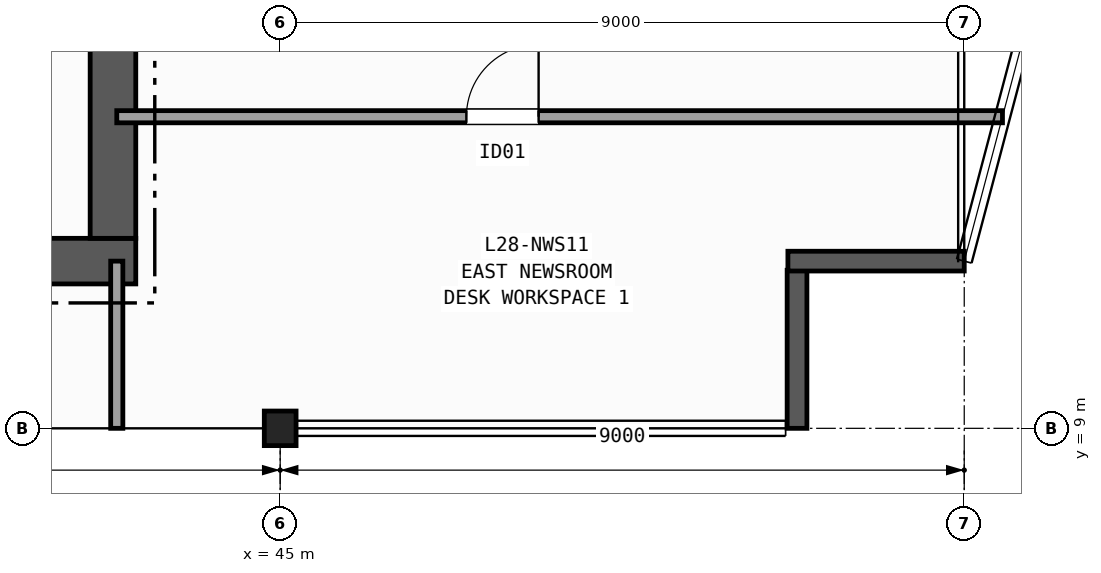
"""IFC4 building model, lengths in metres.
Left out: names, types, materials, properties, quantities, classifications, styles, units other than length and angle.
Written with IfcOpenShell. Run it as: python <this file> out.ifc"""

import sys

from ifc_helpers import new_model, si_unit, direction, frame, frame_2d, origin, origin_2d, place, context, subcontext, project, spatial, rectangle, i_section, extrude, element, fill, save


model = new_model("IFC4")
c1 = context("Model", 3, precision=1e-05, world=origin(), true_north=direction((0.0, 1.0)))
c2 = subcontext(c1, "Body", "Model", "MODEL_VIEW")
j1 = project(units=[si_unit("LENGTHUNIT", "METRE"), si_unit("PLANEANGLEUNIT", "RADIAN")], contexts=[c1])
p1 = place(None, origin())
s1 = spatial("IfcSite", under=j1, at=p1, CompositionType="ELEMENT")
p2 = place(p1, origin())
s2 = spatial("IfcBuilding", under=s1, at=p2, CompositionType="ELEMENT")
p3 = place(p2, frame((0.0, 0.0, 117.4)))
s3 = spatial("IfcBuildingStorey", under=s2, at=p3, CompositionType="ELEMENT", Elevation=117.4)
p4 = place(p3, frame((45.0, 9.0, 0.0), z_axis=(0.0, 0.0, 1.0), x_axis=(1.0, 0.0, 0.0)))
e1 = element("IfcColumn", 1, at=p4, inside=s3, PredefinedType="COLUMN", context=c2, shape_type="SweptSolid", body=[
    extrude(i_section(OverallWidth=0.418, OverallDepth=0.455, WebThickness=0.042, FlangeThickness=0.068, FilletRadius=0.015, at=origin_2d()), origin(), (0.0, 0.0, 1.0), 3.7),
])
p5 = place(p3, frame((51.8, 9.0, 0.0), z_axis=(0.0, 0.0, 1.0), x_axis=(0.0, 1.0, 0.0)))
e2 = element("IfcWall", 2, at=p5, inside=s3, PredefinedType="SOLIDWALL", context=c2, shape_type="SweptSolid", body=[
    extrude(rectangle(XDim=2.08, YDim=0.26, at=frame_2d((1.04, 0.0))), origin(), (0.0, 0.0, 1.0), 3.42),
])
p6 = place(p3, frame((51.68, 11.2, 0.0), z_axis=(0.0, 0.0, 1.0), x_axis=(1.0, 0.0, 0.0)))
e3 = element("IfcWall", 3, at=p6, inside=s3, PredefinedType="SOLIDWALL", context=c2, shape_type="SweptSolid", body=[
    extrude(rectangle(XDim=2.32, YDim=0.26, at=frame_2d((1.16, 0.0))), origin(), (0.0, 0.0, 1.0), 3.42),
])
p7 = place(p3, frame((29.1, 11.2, 0.0), z_axis=(0.0, 0.0, 1.0), x_axis=(1.0, 0.0, 0.0)))
e4 = element("IfcWall", 4, at=p7, inside=s3, PredefinedType="SHEAR", context=c2, shape_type="SweptSolid", body=[
    extrude(rectangle(XDim=14.0, YDim=0.6, at=frame_2d((7.0, 0.0))), origin(), (0.0, 0.0, 1.0), 3.42),
])
p8 = place(p3, frame((42.8, 11.5, 0.0), z_axis=(0.0, 0.0, 1.0), x_axis=(0.0, 1.0, 0.0)))
e5 = element("IfcWall", 5, at=p8, inside=s3, PredefinedType="SHEAR", context=c2, shape_type="SweptSolid", body=[
    extrude(rectangle(XDim=12.8, YDim=0.6, at=frame_2d((6.4, 0.0))), origin(), (0.0, 0.0, 1.0), 3.42),
])
p9 = place(p3, frame((42.85, 9.0, 0.0), z_axis=(0.0, 0.0, 1.0), x_axis=(0.0, 1.0, 0.0)))
e6 = element("IfcWall", 6, at=p9, inside=s3, PredefinedType="PARTITIONING", context=c2, shape_type="SweptSolid", body=[
    extrude(rectangle(XDim=2.2, YDim=0.16, at=frame_2d((1.1, 0.0))), origin(), (0.0, 0.0, 1.0), 2.634),
])
p10 = place(p3, frame((42.85, 13.1, 0.0), z_axis=(0.0, 0.0, 1.0), x_axis=(1.0, 0.0, 0.0)))
e7 = element("IfcWall", 7, at=p10, inside=s3, PredefinedType="PARTITIONING", context=c2, shape_type="SweptSolid", body=[
    extrude(rectangle(XDim=11.653, YDim=0.16, at=frame_2d((5.826, 0.0))), origin(), (0.0, 0.0, 1.0), 3.42),
])
p11 = place(p10, frame((4.6, 0.0, 0.0)))
e8 = element("IfcOpeningElement", 8, at=p11, cuts=e7, PredefinedType="OPENING", context=c2, shape_type="SweptSolid", body=[
    extrude(rectangle(XDim=0.95, YDim=2.1, at=frame_2d((0.475, 1.05))), frame((0.0, 0.09, 0.0), z_axis=(0.0, -1.0, 0.0), x_axis=(1.0, 0.0, 0.0)), (0.0, 0.0, 1.0), 0.18),
])
p12 = place(p11, origin())
e9 = element("IfcDoor", 9, at=p12, inside=s3, OperationType="SINGLE_SWING_RIGHT", PredefinedType="DOOR", context=c2, shape_type="SweptSolid", body=[
    extrude(rectangle(XDim=0.95, YDim=2.1, at=frame_2d((0.475, 1.05))), frame((0.0, 0.025, 0.0), z_axis=(0.0, -1.0, 0.0), x_axis=(1.0, 0.0, 0.0)), (0.0, 0.0, 1.0), 0.05),
])
fill(e8, e9)
save(model, sys.argv[1])
